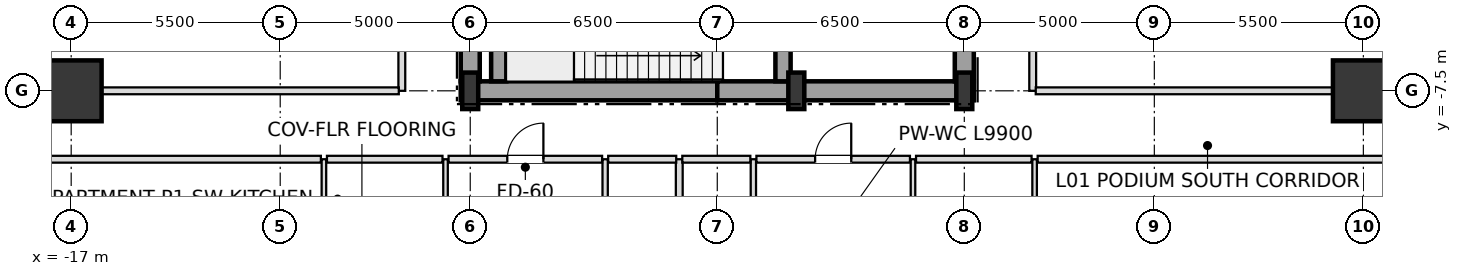
"""IFC4 building model, lengths in metres.
Left out: names, types, materials, properties, quantities, classifications, styles, units other than length and angle.
Written with IfcOpenShell. Run it as: python <this file> out.ifc"""

import sys

from ifc_helpers import new_model, si_unit, direction, frame, frame_2d, origin, origin_2d, place, context, subcontext, project, spatial, rectangle, i_section, extrude, element, fill, save


model = new_model("IFC4")
c1 = context("Model", 3, precision=1e-05, world=origin(), true_north=direction((0.0, 1.0)))
c2 = subcontext(c1, "Body", "Model", "MODEL_VIEW")
j1 = project(units=[si_unit("LENGTHUNIT", "METRE"), si_unit("PLANEANGLEUNIT", "RADIAN")], contexts=[c1])
p1 = place(None, origin())
s1 = spatial("IfcSite", under=j1, at=p1, CompositionType="ELEMENT")
p2 = place(p1, origin())
s2 = spatial("IfcBuilding", under=s1, at=p2, CompositionType="ELEMENT")
p3 = place(p2, frame((0.0, 0.0, 6.0)))
s3 = spatial("IfcBuildingStorey", under=s2, at=p3, CompositionType="ELEMENT", Elevation=6.0)
for number, where, z_axis, x_axis in (
    (1, (-6.5, -7.5, 0.0), (0.0, 0.0, 1.0), (1.0, 0.0, 0.0)),
    (2, (2.08, -7.5, 0.0), (0.0, 0.0, 1.0), (1.0, 0.0, 0.0)),
    (3, (6.5, -7.5, 0.0), (0.0, 0.0, 1.0), (1.0, 0.0, 0.0)),
):
    element("IfcColumn", number, at=place(p3, frame(where, z_axis=z_axis, x_axis=x_axis)), inside=s3, PredefinedType="COLUMN", context=c2, shape_type="SweptSolid", body=[
        extrude(i_section(OverallWidth=0.42, OverallDepth=0.96, WebThickness=0.022, FlangeThickness=0.034, at=origin_2d()), origin(), (0.0, 0.0, 1.0), 5.4),
    ])
for number, where, z_axis, x_axis in (
    (4, (17.0, -7.5, 0.0), (0.0, 0.0, 1.0), (1.0, 0.0, 0.0)),
    (5, (-17.0, -7.5, 0.0), (0.0, 0.0, 1.0), (1.0, 0.0, 0.0)),
):
    element("IfcColumn", number, at=place(p3, frame(where, z_axis=z_axis, x_axis=x_axis)), inside=s3, PredefinedType="USERDEFINED", context=c2, shape_type="SweptSolid", body=[
        extrude(rectangle(XDim=1.6, YDim=1.6, at=origin_2d()), origin(), (0.0, 0.0, 1.0), 5.4),
    ])
for number, where, z_axis, x_axis in (
    (6, (-6.75, -7.5, 0.0), (0.0, 0.0, 1.0), (1.0, 0.0, 0.0)),
    (7, (0.0, -7.5, 0.0), (0.0, 0.0, 1.0), (1.0, 0.0, 0.0)),
):
    element("IfcWall", number, at=place(p3, frame(where, z_axis=z_axis, x_axis=x_axis)), inside=s3, PredefinedType="SHEAR", context=c2, shape_type="SweptSolid", body=[
        extrude(rectangle(XDim=6.75, YDim=0.5, at=frame_2d((3.375, 0.0))), origin(), (0.0, 0.0, 1.0), 5.12),
    ])
p4 = place(p3, frame((-6.5, -7.25, 0.0), z_axis=(0.0, 0.0, 1.0), x_axis=(0.0, 1.0, 0.0)))
e8 = element("IfcWall", 8, at=p4, inside=s3, PredefinedType="SHEAR", context=c2, shape_type="SweptSolid", body=[
    extrude(rectangle(XDim=3.55, YDim=0.5, at=frame_2d((1.775, 0.0))), origin(), (0.0, 0.0, 1.0), 5.12),
])
p5 = place(p3, frame((6.5, -7.25, 0.0), z_axis=(0.0, 0.0, 1.0), x_axis=(0.0, 1.0, 0.0)))
e9 = element("IfcWall", 9, at=p5, inside=s3, PredefinedType="SHEAR", context=c2, shape_type="SweptSolid", body=[
    extrude(rectangle(XDim=5.75, YDim=0.5, at=frame_2d((2.875, 0.0))), origin(), (0.0, 0.0, 1.0), 5.12),
])
p6 = place(p5, frame((0.85, 0.0, 0.0)))
e10 = element("IfcOpeningElement", 10, at=p6, cuts=e9, PredefinedType="OPENING", context=c2, shape_type="SweptSolid", body=[
    extrude(rectangle(XDim=1.05, YDim=2.15, at=frame_2d((0.525, 1.075))), frame((0.0, 0.26, 0.0), z_axis=(0.0, -1.0, 0.0), x_axis=(1.0, 0.0, 0.0)), (0.0, 0.0, 1.0), 0.52),
])
p7 = place(p3, frame((-5.75, -7.25, 0.0), z_axis=(0.0, 0.0, 1.0), x_axis=(0.0, 1.0, 0.0)))
e11 = element("IfcWall", 11, at=p7, inside=s3, PredefinedType="SHEAR", context=c2, shape_type="SweptSolid", body=[
    extrude(rectangle(XDim=2.9, YDim=0.4, at=frame_2d((1.45, 0.0))), origin(), (0.0, 0.0, 1.0), 5.12),
])
p8 = place(p3, frame((1.73, -7.25, 0.0), z_axis=(0.0, 0.0, 1.0), x_axis=(0.0, 1.0, 0.0)))
e12 = element("IfcWall", 12, at=p8, inside=s3, PredefinedType="SHEAR", context=c2, shape_type="SweptSolid", body=[
    extrude(rectangle(XDim=3.3, YDim=0.4, at=frame_2d((1.65, 0.0))), origin(), (0.0, 0.0, 1.0), 5.12),
])
p9 = place(p8, frame((0.9, 0.0, 0.0)))
e13 = element("IfcOpeningElement", 13, at=p9, cuts=e12, PredefinedType="OPENING", context=c2, shape_type="SweptSolid", body=[
    extrude(rectangle(XDim=1.05, YDim=2.15, at=frame_2d((0.525, 1.075))), frame((0.0, 0.21, 0.0), z_axis=(0.0, -1.0, 0.0), x_axis=(1.0, 0.0, 0.0)), (0.0, 0.0, 1.0), 0.42),
])
p10 = place(p3, frame((-10.35, -25.195, 0.0), z_axis=(0.0, 0.0, 1.0), x_axis=(0.0, 1.0, 0.0)))
e14 = element("IfcWall", 14, at=p10, inside=s3, PredefinedType="PARTITIONING", context=c2, shape_type="SweptSolid", body=[
    extrude(rectangle(XDim=15.895, YDim=0.12, at=frame_2d((7.948, 0.0))), origin(), (0.0, 0.0, 1.0), 4.41),
])
p11 = place(p10, frame((10.495, 0.0, 0.0)))
e15 = element("IfcOpeningElement", 15, at=p11, cuts=e14, PredefinedType="OPENING", context=c2, shape_type="SweptSolid", body=[
    extrude(rectangle(XDim=0.9, YDim=2.1, at=frame_2d((0.45, 1.05))), frame((0.0, 0.07, 0.0), z_axis=(0.0, -1.0, 0.0), x_axis=(1.0, 0.0, 0.0)), (0.0, 0.0, 1.0), 0.14),
])
p12 = place(p10, frame((2.545, 0.0, 0.0)))
e16 = element("IfcOpeningElement", 16, at=p12, cuts=e14, PredefinedType="OPENING", context=c2, shape_type="SweptSolid", body=[
    extrude(rectangle(XDim=0.9, YDim=2.1, at=frame_2d((0.45, 1.05))), frame((0.0, 0.07, 0.0), z_axis=(0.0, -1.0, 0.0), x_axis=(1.0, 0.0, 0.0)), (0.0, 0.0, 1.0), 0.14),
])
p13 = place(p3, frame((-8.3, -7.5, 0.0), z_axis=(0.0, 0.0, 1.0), x_axis=(0.0, 1.0, 0.0)))
e17 = element("IfcWall", 17, at=p13, inside=s3, PredefinedType="PARTITIONING", context=c2, shape_type="SweptSolid", body=[
    extrude(rectangle(XDim=15.0, YDim=0.18, at=frame_2d((7.5, 0.0))), origin(), (0.0, 0.0, 1.0), 5.12),
])
p14 = place(p13, frame((7.025, 0.0, 0.0)))
e18 = element("IfcOpeningElement", 18, at=p14, cuts=e17, PredefinedType="OPENING", context=c2, shape_type="SweptSolid", body=[
    extrude(rectangle(XDim=0.95, YDim=2.15, at=frame_2d((0.475, 1.075))), frame((0.0, 0.1, 0.0), z_axis=(0.0, -1.0, 0.0), x_axis=(1.0, 0.0, 0.0)), (0.0, 0.0, 1.0), 0.2),
])
p15 = place(p3, frame((-7.15, -19.2, 0.0), z_axis=(0.0, 0.0, 1.0), x_axis=(0.0, 1.0, 0.0)))
e19 = element("IfcWall", 19, at=p15, inside=s3, PredefinedType="PARTITIONING", context=c2, shape_type="SweptSolid", body=[
    extrude(rectangle(XDim=9.9, YDim=0.12, at=frame_2d((4.95, 0.0))), origin(), (0.0, 0.0, 1.0), 4.41),
])
p16 = place(p15, frame((4.475, 0.0, 0.0)))
e20 = element("IfcOpeningElement", 20, at=p16, cuts=e19, PredefinedType="OPENING", context=c2, shape_type="SweptSolid", body=[
    extrude(rectangle(XDim=0.95, YDim=2.1, at=frame_2d((0.475, 1.05))), frame((0.0, 0.07, 0.0), z_axis=(0.0, -1.0, 0.0), x_axis=(1.0, 0.0, 0.0)), (0.0, 0.0, 1.0), 0.14),
])
p17 = place(p3, frame((-2.95, -19.2, 0.0), z_axis=(0.0, 0.0, 1.0), x_axis=(0.0, 1.0, 0.0)))
e21 = element("IfcWall", 21, at=p17, inside=s3, PredefinedType="PARTITIONING", context=c2, shape_type="SweptSolid", body=[
    extrude(rectangle(XDim=9.9, YDim=0.14, at=frame_2d((4.95, 0.0))), origin(), (0.0, 0.0, 1.0), 4.642),
])
p18 = place(p17, frame((4.5, 0.0, 0.0)))
e22 = element("IfcOpeningElement", 22, at=p18, cuts=e21, PredefinedType="OPENING", context=c2, shape_type="SweptSolid", body=[
    extrude(rectangle(XDim=0.9, YDim=2.1, at=frame_2d((0.45, 1.05))), frame((0.0, 0.08, 0.0), z_axis=(0.0, -1.0, 0.0), x_axis=(1.0, 0.0, 0.0)), (0.0, 0.0, 1.0), 0.16),
])
p19 = place(p3, frame((-1.0, -25.255, 0.0), z_axis=(0.0, 0.0, 1.0), x_axis=(0.0, 1.0, 0.0)))
e23 = element("IfcWall", 23, at=p19, inside=s3, PredefinedType="PARTITIONING", context=c2, shape_type="SweptSolid", body=[
    extrude(rectangle(XDim=15.955, YDim=0.18, at=frame_2d((7.978, 0.0))), origin(), (0.0, 0.0, 1.0), 4.476),
])
p20 = place(p3, frame((0.95, -19.2, 0.0), z_axis=(0.0, 0.0, 1.0), x_axis=(0.0, 1.0, 0.0)))
e24 = element("IfcWall", 24, at=p20, inside=s3, PredefinedType="PARTITIONING", context=c2, shape_type="SweptSolid", body=[
    extrude(rectangle(XDim=9.9, YDim=0.14, at=frame_2d((4.95, 0.0))), origin(), (0.0, 0.0, 1.0), 4.642),
])
p21 = place(p20, frame((4.5, 0.0, 0.0)))
e25 = element("IfcOpeningElement", 25, at=p21, cuts=e24, PredefinedType="OPENING", context=c2, shape_type="SweptSolid", body=[
    extrude(rectangle(XDim=0.9, YDim=2.1, at=frame_2d((0.45, 1.05))), frame((0.0, 0.08, 0.0), z_axis=(0.0, -1.0, 0.0), x_axis=(1.0, 0.0, 0.0)), (0.0, 0.0, 1.0), 0.16),
])
p22 = place(p3, frame((5.15, -19.2, 0.0), z_axis=(0.0, 0.0, 1.0), x_axis=(0.0, 1.0, 0.0)))
e26 = element("IfcWall", 26, at=p22, inside=s3, PredefinedType="PARTITIONING", context=c2, shape_type="SweptSolid", body=[
    extrude(rectangle(XDim=9.9, YDim=0.12, at=frame_2d((4.95, 0.0))), origin(), (0.0, 0.0, 1.0), 4.642),
])
p23 = place(p22, frame((4.475, 0.0, 0.0)))
e27 = element("IfcOpeningElement", 27, at=p23, cuts=e26, PredefinedType="OPENING", context=c2, shape_type="SweptSolid", body=[
    extrude(rectangle(XDim=0.95, YDim=2.1, at=frame_2d((0.475, 1.05))), frame((0.0, 0.07, 0.0), z_axis=(0.0, -1.0, 0.0), x_axis=(1.0, 0.0, 0.0)), (0.0, 0.0, 1.0), 0.14),
])
p24 = place(p3, frame((8.3, -7.5, 0.0), z_axis=(0.0, 0.0, 1.0), x_axis=(0.0, 1.0, 0.0)))
e28 = element("IfcWall", 28, at=p24, inside=s3, PredefinedType="PARTITIONING", context=c2, shape_type="SweptSolid", body=[
    extrude(rectangle(XDim=15.0, YDim=0.18, at=frame_2d((7.5, 0.0))), origin(), (0.0, 0.0, 1.0), 5.12),
])
p25 = place(p24, frame((5.025, 0.0, 0.0)))
e29 = element("IfcOpeningElement", 29, at=p25, cuts=e28, PredefinedType="OPENING", context=c2, shape_type="SweptSolid", body=[
    extrude(rectangle(XDim=0.95, YDim=2.15, at=frame_2d((0.475, 1.075))), frame((0.0, 0.1, 0.0), z_axis=(0.0, -1.0, 0.0), x_axis=(1.0, 0.0, 0.0)), (0.0, 0.0, 1.0), 0.2),
])
p26 = place(p24, frame((12.225, 0.0, 0.0)))
e30 = element("IfcOpeningElement", 30, at=p26, cuts=e28, PredefinedType="OPENING", context=c2, shape_type="SweptSolid", body=[
    extrude(rectangle(XDim=0.95, YDim=2.15, at=frame_2d((0.475, 1.075))), frame((0.0, 0.1, 0.0), z_axis=(0.0, -1.0, 0.0), x_axis=(1.0, 0.0, 0.0)), (0.0, 0.0, 1.0), 0.2),
])
p27 = place(p3, frame((8.35, -19.2, 0.0), z_axis=(0.0, 0.0, 1.0), x_axis=(0.0, 1.0, 0.0)))
e31 = element("IfcWall", 31, at=p27, inside=s3, PredefinedType="PARTITIONING", context=c2, shape_type="SweptSolid", body=[
    extrude(rectangle(XDim=9.9, YDim=0.12, at=frame_2d((4.95, 0.0))), origin(), (0.0, 0.0, 1.0), 4.41),
])
p28 = place(p27, frame((4.475, 0.0, 0.0)))
e32 = element("IfcOpeningElement", 32, at=p28, cuts=e31, PredefinedType="OPENING", context=c2, shape_type="SweptSolid", body=[
    extrude(rectangle(XDim=0.95, YDim=2.1, at=frame_2d((0.475, 1.05))), frame((0.0, 0.07, 0.0), z_axis=(0.0, -1.0, 0.0), x_axis=(1.0, 0.0, 0.0)), (0.0, 0.0, 1.0), 0.14),
])
p29 = place(p3, frame((-22.695, -9.3, 0.0), z_axis=(0.0, 0.0, 1.0), x_axis=(1.0, 0.0, 0.0)))
e33 = element("IfcWall", 33, at=p29, inside=s3, PredefinedType="PARTITIONING", context=c2, shape_type="SweptSolid", body=[
    extrude(rectangle(XDim=12.265, YDim=0.18, at=frame_2d((6.133, 0.0))), origin(), (0.0, 0.0, 1.0), 4.41),
])
p30 = place(p3, frame((-10.27, -9.3, 0.0), z_axis=(0.0, 0.0, 1.0), x_axis=(1.0, 0.0, 0.0)))
e34 = element("IfcWall", 34, at=p30, inside=s3, PredefinedType="PARTITIONING", context=c2, shape_type="SweptSolid", body=[
    extrude(rectangle(XDim=3.04, YDim=0.18, at=frame_2d((1.52, 0.0))), origin(), (0.0, 0.0, 1.0), 5.12),
])
p31 = place(p3, frame((-7.07, -9.3, 0.0), z_axis=(0.0, 0.0, 1.0), x_axis=(1.0, 0.0, 0.0)))
e35 = element("IfcWall", 35, at=p31, inside=s3, PredefinedType="PARTITIONING", context=c2, shape_type="SweptSolid", body=[
    extrude(rectangle(XDim=4.04, YDim=0.18, at=frame_2d((2.02, 0.0))), origin(), (0.0, 0.0, 1.0), 4.41),
])
p32 = place(p31, frame((1.545, 0.0, 0.0)))
e36 = element("IfcOpeningElement", 36, at=p32, cuts=e35, PredefinedType="OPENING", context=c2, shape_type="SweptSolid", body=[
    extrude(rectangle(XDim=0.95, YDim=2.15, at=frame_2d((0.475, 1.075))), frame((0.0, 0.1, 0.0), z_axis=(0.0, -1.0, 0.0), x_axis=(1.0, 0.0, 0.0)), (0.0, 0.0, 1.0), 0.2),
])
for number, where, z_axis, x_axis in (
    (37, (-2.87, -9.3, 0.0), (0.0, 0.0, 1.0), (1.0, 0.0, 0.0)),
    (38, (-0.92, -9.3, 0.0), (0.0, 0.0, 1.0), (1.0, 0.0, 0.0)),
):
    element("IfcWall", number, at=place(p3, frame(where, z_axis=z_axis, x_axis=x_axis)), inside=s3, PredefinedType="PARTITIONING", context=c2, shape_type="SweptSolid", body=[
        extrude(rectangle(XDim=1.79, YDim=0.18, at=frame_2d((0.895, 0.0))), origin(), (0.0, 0.0, 1.0), 5.12),
    ])
p33 = place(p3, frame((1.03, -9.3, 0.0), z_axis=(0.0, 0.0, 1.0), x_axis=(1.0, 0.0, 0.0)))
e39 = element("IfcWall", 39, at=p33, inside=s3, PredefinedType="PARTITIONING", context=c2, shape_type="SweptSolid", body=[
    extrude(rectangle(XDim=4.04, YDim=0.18, at=frame_2d((2.02, 0.0))), origin(), (0.0, 0.0, 1.0), 5.12),
])
p34 = place(p33, frame((1.545, 0.0, 0.0)))
e40 = element("IfcOpeningElement", 40, at=p34, cuts=e39, PredefinedType="OPENING", context=c2, shape_type="SweptSolid", body=[
    extrude(rectangle(XDim=0.95, YDim=2.15, at=frame_2d((0.475, 1.075))), frame((0.0, 0.1, 0.0), z_axis=(0.0, -1.0, 0.0), x_axis=(1.0, 0.0, 0.0)), (0.0, 0.0, 1.0), 0.2),
])
p35 = place(p3, frame((5.23, -9.3, 0.0), z_axis=(0.0, 0.0, 1.0), x_axis=(1.0, 0.0, 0.0)))
e41 = element("IfcWall", 41, at=p35, inside=s3, PredefinedType="PARTITIONING", context=c2, shape_type="SweptSolid", body=[
    extrude(rectangle(XDim=3.04, YDim=0.18, at=frame_2d((1.52, 0.0))), origin(), (0.0, 0.0, 1.0), 4.41),
])
p36 = place(p3, frame((8.43, -9.3, 0.0), z_axis=(0.0, 0.0, 1.0), x_axis=(1.0, 0.0, 0.0)))
e42 = element("IfcWall", 42, at=p36, inside=s3, PredefinedType="PARTITIONING", context=c2, shape_type="SweptSolid", body=[
    extrude(rectangle(XDim=14.305, YDim=0.18, at=frame_2d((7.153, 0.0))), origin(), (0.0, 0.0, 1.0), 4.41),
])
p37 = place(p3, frame((-22.695, -7.5, 0.0), z_axis=(0.0, 0.0, 1.0), x_axis=(1.0, 0.0, 0.0)))
e43 = element("IfcWall", 43, at=p37, inside=s3, PredefinedType="PARTITIONING", context=c2, shape_type="SweptSolid", body=[
    extrude(rectangle(XDim=14.315, YDim=0.18, at=frame_2d((7.158, 0.0))), origin(), (0.0, 0.0, 1.0), 4.41),
])
p38 = place(p3, frame((8.38, -7.5, 0.0), z_axis=(0.0, 0.0, 1.0), x_axis=(1.0, 0.0, 0.0)))
e44 = element("IfcWall", 44, at=p38, inside=s3, PredefinedType="PARTITIONING", context=c2, shape_type="SweptSolid", body=[
    extrude(rectangle(XDim=14.355, YDim=0.18, at=frame_2d((7.178, 0.0))), origin(), (0.0, 0.0, 1.0), 4.41),
])
p39 = place(p32, origin())
e45 = element("IfcDoor", 45, at=p39, inside=s3, OperationType="SINGLE_SWING_RIGHT", PredefinedType="DOOR", context=c2, shape_type="SweptSolid", body=[
    extrude(rectangle(XDim=0.95, YDim=2.15, at=frame_2d((0.475, 1.075))), frame((0.0, 0.025, 0.0), z_axis=(0.0, -1.0, 0.0), x_axis=(1.0, 0.0, 0.0)), (0.0, 0.0, 1.0), 0.05),
])
fill(e36, e45)
p40 = place(p34, origin())
e46 = element("IfcDoor", 46, at=p40, inside=s3, OperationType="SINGLE_SWING_RIGHT", PredefinedType="DOOR", context=c2, shape_type="SweptSolid", body=[
    extrude(rectangle(XDim=0.95, YDim=2.15, at=frame_2d((0.475, 1.075))), frame((0.0, 0.025, 0.0), z_axis=(0.0, -1.0, 0.0), x_axis=(1.0, 0.0, 0.0)), (0.0, 0.0, 1.0), 0.05),
])
fill(e40, e46)
save(model, sys.argv[1])
